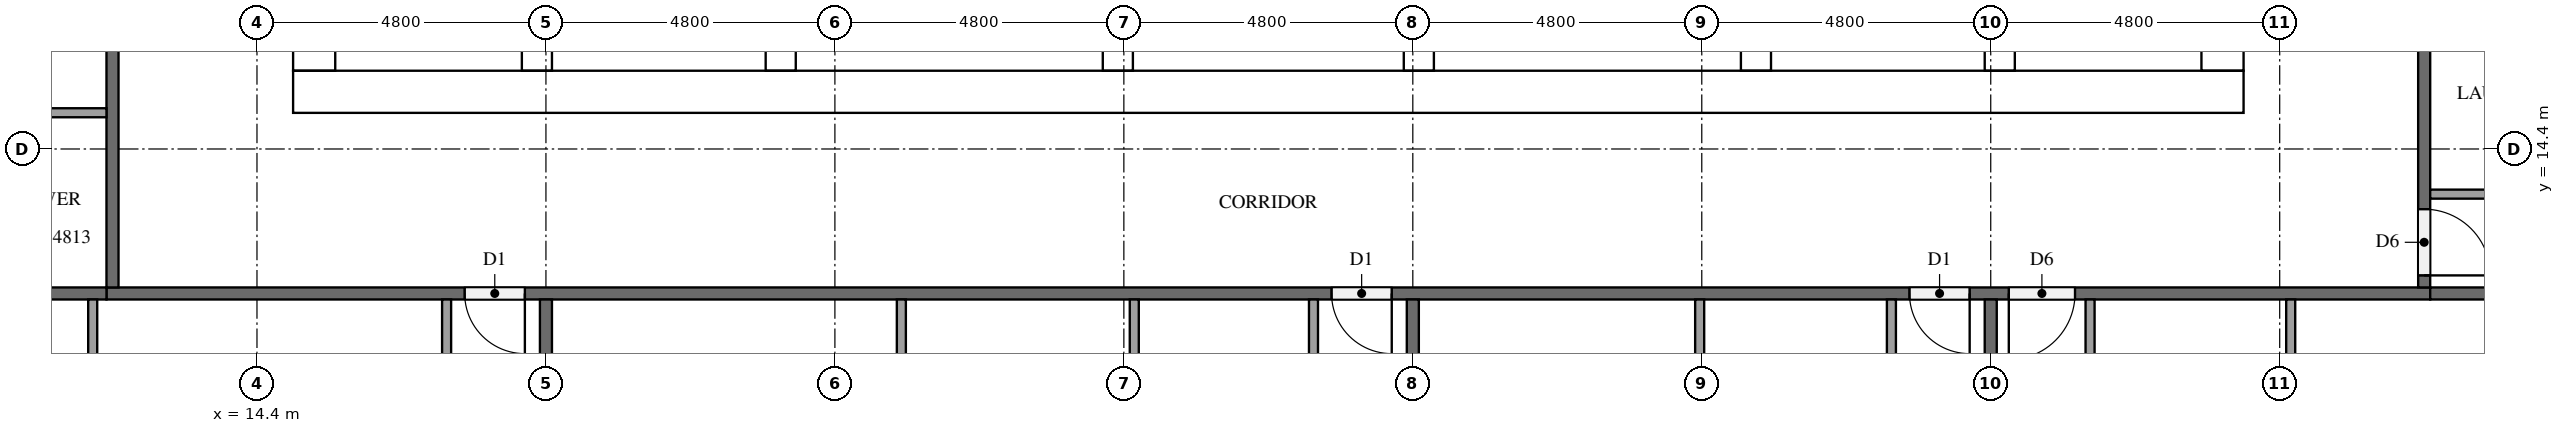
"""IFC4 building model, lengths in metres.
Left out: names, types, materials, properties, quantities, classifications, styles, units other than length and angle.
Written with IfcOpenShell. Run it as: python <this file> out.ifc"""

import sys

from ifc_helpers import new_model, si_unit, direction, frame, frame_2d, origin, place, context, subcontext, project, spatial, rectangle, extrude, element, fill, save


model = new_model("IFC4")
c1 = context("Model", 3, precision=1e-05, world=origin(), true_north=direction((0.0, 1.0)))
c2 = subcontext(c1, "Body", "Model", "MODEL_VIEW")
j1 = project(units=[si_unit("LENGTHUNIT", "METRE"), si_unit("PLANEANGLEUNIT", "RADIAN")], contexts=[c1])
p1 = place(None, origin())
s1 = spatial("IfcSite", under=j1, at=p1, CompositionType="ELEMENT")
p2 = place(p1, origin())
s2 = spatial("IfcBuilding", under=s1, at=p2, CompositionType="ELEMENT")
p3 = place(p2, frame((0.0, 0.0, 185.9)))
s3 = spatial("IfcBuildingStorey", under=s2, at=p3, CompositionType="ELEMENT", Elevation=185.9)
p4 = place(p3, frame((15.0, 15.35, 0.0), z_axis=(0.0, 0.0, 1.0), x_axis=(1.0, 0.0, 0.0)))
e1 = element("IfcWall", 1, at=p4, inside=s3, PredefinedType="SHEAR", context=c2, shape_type="SweptSolid", body=[
    extrude(rectangle(XDim=32.4, YDim=0.7, at=frame_2d((16.2, 0.0))), origin(), (0.0, 0.0, 1.0), 3.2),
])
p5 = place(p4, frame((15.3, 0.0, 0.0)))
e2 = element("IfcOpeningElement", 2, at=p5, cuts=e1, PredefinedType="OPENING", context=c2, shape_type="SweptSolid", body=[
    extrude(rectangle(XDim=1.8, YDim=2.1, at=frame_2d((0.9, 1.05))), frame((0.0, 0.36, 0.0), z_axis=(0.0, -1.0, 0.0), x_axis=(1.0, 0.0, 0.0)), (0.0, 0.0, 1.0), 0.72),
])
p6 = place(p3, frame((15.35, 15.7, 0.0), z_axis=(0.0, 0.0, 1.0), x_axis=(0.0, 1.0, 0.0)))
e3 = element("IfcWall", 3, at=p6, inside=s3, PredefinedType="SHEAR", context=c2, shape_type="SweptSolid", body=[
    extrude(rectangle(XDim=21.4, YDim=0.7, at=frame_2d((10.7, 0.0))), origin(), (0.0, 0.0, 1.0), 3.2),
])
p7 = place(p6, frame((5.06, 0.0, 0.0)))
e4 = element("IfcOpeningElement", 4, at=p7, cuts=e3, PredefinedType="OPENING", context=c2, shape_type="SweptSolid", body=[
    extrude(rectangle(XDim=1.2, YDim=2.1, at=frame_2d((0.6, 1.05))), frame((0.0, 0.36, 0.0), z_axis=(0.0, -1.0, 0.0), x_axis=(1.0, 0.0, 0.0)), (0.0, 0.0, 1.0), 0.72),
])
p8 = place(p3, frame((47.05, 15.7, 0.0), z_axis=(0.0, 0.0, 1.0), x_axis=(0.0, 1.0, 0.0)))
e5 = element("IfcWall", 5, at=p8, inside=s3, PredefinedType="SHEAR", context=c2, shape_type="SweptSolid", body=[
    extrude(rectangle(XDim=21.4, YDim=0.7, at=frame_2d((10.7, 0.0))), origin(), (0.0, 0.0, 1.0), 3.2),
])
p9 = place(p8, frame((10.4, 0.0, 0.0)))
e6 = element("IfcOpeningElement", 6, at=p9, cuts=e5, PredefinedType="OPENING", context=c2, shape_type="SweptSolid", body=[
    extrude(rectangle(XDim=1.2, YDim=2.1, at=frame_2d((0.6, 1.05))), frame((0.0, 0.36, 0.0), z_axis=(0.0, -1.0, 0.0), x_axis=(1.0, 0.0, 0.0)), (0.0, 0.0, 1.0), 0.72),
])
p10 = place(p3, frame((19.05, 15.7, 0.0), z_axis=(0.0, 0.0, 1.0), x_axis=(0.0, 1.0, 0.0)))
e7 = element("IfcWall", 7, at=p10, inside=s3, PredefinedType="SHEAR", context=c2, shape_type="SweptSolid", body=[
    extrude(rectangle(XDim=15.3, YDim=0.5, at=frame_2d((7.65, 0.0))), origin(), (0.0, 0.0, 1.0), 3.2),
])
p11 = place(p10, frame((9.75, 0.0, 0.0)))
e8 = element("IfcOpeningElement", 8, at=p11, cuts=e7, PredefinedType="OPENING", context=c2, shape_type="SweptSolid", body=[
    extrude(rectangle(XDim=1.1, YDim=2.1, at=frame_2d((0.55, 1.05))), frame((0.0, 0.26, 0.0), z_axis=(0.0, -1.0, 0.0), x_axis=(1.0, 0.0, 0.0)), (0.0, 0.0, 1.0), 0.52),
])
p12 = place(p10, frame((13.25, 0.0, 0.0)))
e9 = element("IfcOpeningElement", 9, at=p12, cuts=e7, PredefinedType="OPENING", context=c2, shape_type="SweptSolid", body=[
    extrude(rectangle(XDim=1.1, YDim=2.1, at=frame_2d((0.55, 1.05))), frame((0.0, 0.26, 0.0), z_axis=(0.0, -1.0, 0.0), x_axis=(1.0, 0.0, 0.0)), (0.0, 0.0, 1.0), 0.52),
])
p13 = place(p10, frame((0.5, 0.0, 0.0)))
e10 = element("IfcOpeningElement", 10, at=p13, cuts=e7, PredefinedType="OPENING", context=c2, shape_type="SweptSolid", body=[
    extrude(rectangle(XDim=1.2, YDim=2.1, at=frame_2d((0.6, 1.05))), frame((0.0, 0.26, 0.0), z_axis=(0.0, -1.0, 0.0), x_axis=(1.0, 0.0, 0.0)), (0.0, 0.0, 1.0), 0.52),
])
p14 = place(p3, frame((23.1, 15.7, 0.0), z_axis=(0.0, 0.0, 1.0), x_axis=(0.0, 1.0, 0.0)))
e11 = element("IfcWall", 11, at=p14, inside=s3, PredefinedType="SHEAR", context=c2, shape_type="SweptSolid", body=[
    extrude(rectangle(XDim=21.4, YDim=0.5, at=frame_2d((10.7, 0.0))), origin(), (0.0, 0.0, 1.0), 3.2),
])
p15 = place(p3, frame((39.3, 15.7, 0.0), z_axis=(0.0, 0.0, 1.0), x_axis=(0.0, 1.0, 0.0)))
e12 = element("IfcWall", 12, at=p15, inside=s3, PredefinedType="SHEAR", context=c2, shape_type="SweptSolid", body=[
    extrude(rectangle(XDim=8.55, YDim=0.5, at=frame_2d((4.275, 0.0))), origin(), (0.0, 0.0, 1.0), 3.2),
])
p16 = place(p3, frame((43.35, 15.7, 0.0), z_axis=(0.0, 0.0, 1.0), x_axis=(0.0, 1.0, 0.0)))
e13 = element("IfcWall", 13, at=p16, inside=s3, PredefinedType="SHEAR", context=c2, shape_type="SweptSolid", body=[
    extrude(rectangle(XDim=8.55, YDim=0.5, at=frame_2d((4.275, 0.0))), origin(), (0.0, 0.0, 1.0), 3.2),
])
p17 = place(p16, frame((0.5, 0.0, 0.0)))
e14 = element("IfcOpeningElement", 14, at=p17, cuts=e13, PredefinedType="OPENING", context=c2, shape_type="SweptSolid", body=[
    extrude(rectangle(XDim=1.2, YDim=2.1, at=frame_2d((0.6, 1.05))), frame((0.0, 0.26, 0.0), z_axis=(0.0, -1.0, 0.0), x_axis=(1.0, 0.0, 0.0)), (0.0, 0.0, 1.0), 0.52),
])
for number, where, z_axis, x_axis in (
    (15, (28.7, 15.7, 0.0), (0.0, 0.0, 1.0), (0.0, 1.0, 0.0)),
    (16, (33.7, 15.7, 0.0), (0.0, 0.0, 1.0), (0.0, 1.0, 0.0)),
):
    element("IfcWall", number, at=place(p3, frame(where, z_axis=z_axis, x_axis=x_axis)), inside=s3, PredefinedType="SHEAR", context=c2, shape_type="SweptSolid", body=[
        extrude(rectangle(XDim=2.8, YDim=0.5, at=frame_2d((1.4, 0.0))), origin(), (0.0, 0.0, 1.0), 3.2),
    ])
p18 = place(p3, frame((50.5, 12.0, 0.0), z_axis=(0.0, 0.0, 1.0), x_axis=(-1.0, 0.0, 0.0)))
e17 = element("IfcWall", 17, at=p18, inside=s3, PredefinedType="PARTITIONING", context=c2, shape_type="SweptSolid", body=[
    extrude(rectangle(XDim=38.6, YDim=0.2, at=frame_2d((19.3, 0.0))), origin(), (0.0, 0.0, 1.0), 3.2),
])
p19 = place(p18, frame((31.65, 0.0, 0.0)))
e18 = element("IfcOpeningElement", 18, at=p19, cuts=e17, PredefinedType="OPENING", context=c2, shape_type="SweptSolid", body=[
    extrude(rectangle(XDim=1.0, YDim=2.1, at=frame_2d((0.5, 1.05))), frame((0.0, 0.11, 0.0), z_axis=(0.0, -1.0, 0.0), x_axis=(1.0, 0.0, 0.0)), (0.0, 0.0, 1.0), 0.22),
])
p20 = place(p18, frame((17.25, 0.0, 0.0)))
e19 = element("IfcOpeningElement", 19, at=p20, cuts=e17, PredefinedType="OPENING", context=c2, shape_type="SweptSolid", body=[
    extrude(rectangle(XDim=1.0, YDim=2.1, at=frame_2d((0.5, 1.05))), frame((0.0, 0.11, 0.0), z_axis=(0.0, -1.0, 0.0), x_axis=(1.0, 0.0, 0.0)), (0.0, 0.0, 1.0), 0.22),
])
p21 = place(p18, frame((7.65, 0.0, 0.0)))
e20 = element("IfcOpeningElement", 20, at=p21, cuts=e17, PredefinedType="OPENING", context=c2, shape_type="SweptSolid", body=[
    extrude(rectangle(XDim=1.0, YDim=2.1, at=frame_2d((0.5, 1.05))), frame((0.0, 0.11, 0.0), z_axis=(0.0, -1.0, 0.0), x_axis=(1.0, 0.0, 0.0)), (0.0, 0.0, 1.0), 0.22),
])
p22 = place(p18, frame((5.9, 0.0, 0.0)))
e21 = element("IfcOpeningElement", 21, at=p22, cuts=e17, PredefinedType="OPENING", context=c2, shape_type="SweptSolid", body=[
    extrude(rectangle(XDim=1.1, YDim=2.1, at=frame_2d((0.55, 1.05))), frame((0.0, 0.11, 0.0), z_axis=(0.0, -1.0, 0.0), x_axis=(1.0, 0.0, 0.0)), (0.0, 0.0, 1.0), 0.22),
])
p23 = place(p3, frame((50.4, 40.7, 0.0), z_axis=(0.0, 0.0, 1.0), x_axis=(0.0, -1.0, 0.0)))
e22 = element("IfcWall", 22, at=p23, inside=s3, PredefinedType="PARTITIONING", context=c2, shape_type="SweptSolid", body=[
    extrude(rectangle(XDim=28.6, YDim=0.2, at=frame_2d((14.3, 0.0))), origin(), (0.0, 0.0, 1.0), 3.2),
])
p24 = place(p23, frame((27.3, 0.0, 0.0)))
e23 = element("IfcOpeningElement", 23, at=p24, cuts=e22, PredefinedType="OPENING", context=c2, shape_type="SweptSolid", body=[
    extrude(rectangle(XDim=1.1, YDim=2.1, at=frame_2d((0.55, 1.05))), frame((0.0, 0.11, 0.0), z_axis=(0.0, -1.0, 0.0), x_axis=(1.0, 0.0, 0.0)), (0.0, 0.0, 1.0), 0.22),
])
p25 = place(p23, frame((8.15, 0.0, 0.0)))
e24 = element("IfcOpeningElement", 24, at=p25, cuts=e22, PredefinedType="OPENING", context=c2, shape_type="SweptSolid", body=[
    extrude(rectangle(XDim=1.0, YDim=2.1, at=frame_2d((0.5, 1.05))), frame((0.0, 0.11, 0.0), z_axis=(0.0, -1.0, 0.0), x_axis=(1.0, 0.0, 0.0)), (0.0, 0.0, 1.0), 0.22),
])
p26 = place(p23, frame((0.95, 0.0, 0.0)))
e25 = element("IfcOpeningElement", 25, at=p26, cuts=e22, PredefinedType="OPENING", context=c2, shape_type="SweptSolid", body=[
    extrude(rectangle(XDim=1.0, YDim=2.1, at=frame_2d((0.5, 1.05))), frame((0.0, 0.11, 0.0), z_axis=(0.0, -1.0, 0.0), x_axis=(1.0, 0.0, 0.0)), (0.0, 0.0, 1.0), 0.22),
])
p27 = place(p3, frame((12.0, 12.1, 0.0), z_axis=(0.0, 0.0, 1.0), x_axis=(0.0, 1.0, 0.0)))
e26 = element("IfcWall", 26, at=p27, inside=s3, PredefinedType="PARTITIONING", context=c2, shape_type="SweptSolid", body=[
    extrude(rectangle(XDim=28.6, YDim=0.2, at=frame_2d((14.3, 0.0))), origin(), (0.0, 0.0, 1.0), 3.2),
])
p28 = place(p27, frame((26.65, 0.0, 0.0)))
e27 = element("IfcOpeningElement", 27, at=p28, cuts=e26, PredefinedType="OPENING", context=c2, shape_type="SweptSolid", body=[
    extrude(rectangle(XDim=1.0, YDim=2.1, at=frame_2d((0.5, 1.05))), frame((0.0, 0.11, 0.0), z_axis=(0.0, -1.0, 0.0), x_axis=(1.0, 0.0, 0.0)), (0.0, 0.0, 1.0), 0.22),
])
p29 = place(p27, frame((24.95, 0.0, 0.0)))
e28 = element("IfcOpeningElement", 28, at=p29, cuts=e26, PredefinedType="OPENING", context=c2, shape_type="SweptSolid", body=[
    extrude(rectangle(XDim=1.0, YDim=2.1, at=frame_2d((0.5, 1.05))), frame((0.0, 0.11, 0.0), z_axis=(0.0, -1.0, 0.0), x_axis=(1.0, 0.0, 0.0)), (0.0, 0.0, 1.0), 0.22),
])
p30 = place(p27, frame((12.95, 0.0, 0.0)))
e29 = element("IfcOpeningElement", 29, at=p30, cuts=e26, PredefinedType="OPENING", context=c2, shape_type="SweptSolid", body=[
    extrude(rectangle(XDim=1.0, YDim=2.1, at=frame_2d((0.5, 1.05))), frame((0.0, 0.11, 0.0), z_axis=(0.0, -1.0, 0.0), x_axis=(1.0, 0.0, 0.0)), (0.0, 0.0, 1.0), 0.22),
])
p31 = place(p3, frame((19.2, 11.9, 0.0), z_axis=(0.0, 0.0, 1.0), x_axis=(0.0, -1.0, 0.0)))
e30 = element("IfcWall", 30, at=p31, inside=s3, PredefinedType="PARTITIONING", context=c2, shape_type="SweptSolid", body=[
    extrude(rectangle(XDim=11.575, YDim=0.2, at=frame_2d((5.788, 0.0))), origin(), (0.0, 0.0, 1.0), 3.2),
])
p32 = place(p3, frame((4.9, 12.0, 0.0), z_axis=(0.0, 0.0, 1.0), x_axis=(1.0, 0.0, 0.0)))
e31 = element("IfcWall", 31, at=p32, inside=s3, PredefinedType="PARTITIONING", context=c2, shape_type="SweptSolid", body=[
    extrude(rectangle(XDim=7.0, YDim=0.2, at=frame_2d((3.5, 0.0))), origin(), (0.0, 0.0, 1.0), 3.2),
])
for number, where, z_axis, x_axis in (
    (32, (33.6, 11.9, 0.0), (0.0, 0.0, 1.0), (0.0, -1.0, 0.0)),
    (33, (43.2, 11.9, 0.0), (0.0, 0.0, 1.0), (0.0, -1.0, 0.0)),
):
    element("IfcWall", number, at=place(p3, frame(where, z_axis=z_axis, x_axis=x_axis)), inside=s3, PredefinedType="PARTITIONING", context=c2, shape_type="SweptSolid", body=[
        extrude(rectangle(XDim=11.8, YDim=0.2, at=frame_2d((5.9, 0.0))), origin(), (0.0, 0.0, 1.0), 3.2),
    ])
p33 = place(p3, frame((50.5, 12.0, 0.0), z_axis=(0.0, 0.0, 1.0), x_axis=(1.0, 0.0, 0.0)))
e34 = element("IfcWall", 34, at=p33, inside=s3, PredefinedType="PARTITIONING", context=c2, shape_type="SweptSolid", body=[
    extrude(rectangle(XDim=11.8, YDim=0.2, at=frame_2d((5.9, 0.0))), origin(), (0.0, 0.0, 1.0), 3.2),
])
p34 = place(p3, frame((11.671, 11.9, 0.0), z_axis=(0.0, 0.0, 1.0), x_axis=(0.0, -1.0, 0.0)))
e35 = element("IfcWall", 35, at=p34, inside=s3, PredefinedType="PARTITIONING", context=c2, shape_type="SweptSolid", body=[
    extrude(rectangle(XDim=4.325, YDim=0.15, at=frame_2d((2.163, 0.0))), origin(), (0.0, 0.0, 1.0), 3.2),
])
p35 = place(p3, frame((17.55, 11.9, 0.0), z_axis=(0.0, 0.0, 1.0), x_axis=(0.0, -1.0, 0.0)))
e36 = element("IfcWall", 36, at=p35, inside=s3, PredefinedType="PARTITIONING", context=c2, shape_type="SweptSolid", body=[
    extrude(rectangle(XDim=4.475, YDim=0.15, at=frame_2d((2.237, 0.0))), origin(), (0.0, 0.0, 1.0), 3.2),
])
for number, where, z_axis, x_axis in (
    (37, (28.973, 11.9, 0.0), (0.0, 0.0, 1.0), (0.0, -1.0, 0.0)),
    (38, (25.104, 11.9, 0.0), (0.0, 0.0, 1.0), (0.0, -1.0, 0.0)),
):
    element("IfcWall", number, at=place(p3, frame(where, z_axis=z_axis, x_axis=x_axis)), inside=s3, PredefinedType="PARTITIONING", context=c2, shape_type="SweptSolid", body=[
        extrude(rectangle(XDim=3.575, YDim=0.15, at=frame_2d((1.788, 0.0))), origin(), (0.0, 0.0, 1.0), 3.2),
    ])
for number, where, z_axis, x_axis in (
    (39, (31.95, 11.9, 0.0), (0.0, 0.0, 1.0), (0.0, -1.0, 0.0)),
    (40, (38.365, 11.9, 0.0), (0.0, 0.0, 1.0), (0.0, -1.0, 0.0)),
):
    element("IfcWall", number, at=place(p3, frame(where, z_axis=z_axis, x_axis=x_axis)), inside=s3, PredefinedType="PARTITIONING", context=c2, shape_type="SweptSolid", body=[
        extrude(rectangle(XDim=3.725, YDim=0.15, at=frame_2d((1.862, 0.0))), origin(), (0.0, 0.0, 1.0), 3.2),
    ])
p36 = place(p3, frame((41.55, 11.9, 0.0), z_axis=(0.0, 0.0, 1.0), x_axis=(0.0, -1.0, 0.0)))
e41 = element("IfcWall", 41, at=p36, inside=s3, PredefinedType="PARTITIONING", context=c2, shape_type="SweptSolid", body=[
    extrude(rectangle(XDim=3.875, YDim=0.15, at=frame_2d((1.938, 0.0))), origin(), (0.0, 0.0, 1.0), 3.2),
])
p37 = place(p3, frame((48.183, 11.9, 0.0), z_axis=(0.0, 0.0, 1.0), x_axis=(0.0, -1.0, 0.0)))
e42 = element("IfcWall", 42, at=p37, inside=s3, PredefinedType="PARTITIONING", context=c2, shape_type="SweptSolid", body=[
    extrude(rectangle(XDim=4.325, YDim=0.15, at=frame_2d((2.163, 0.0))), origin(), (0.0, 0.0, 1.0), 3.2),
])
p38 = place(p3, frame((44.85, 11.9, 0.0), z_axis=(0.0, 0.0, 1.0), x_axis=(0.0, -1.0, 0.0)))
e43 = element("IfcWall", 43, at=p38, inside=s3, PredefinedType="PARTITIONING", context=c2, shape_type="SweptSolid", body=[
    extrude(rectangle(XDim=4.475, YDim=0.15, at=frame_2d((2.237, 0.0))), origin(), (0.0, 0.0, 1.0), 3.2),
])
p39 = place(p3, frame((50.5, 13.65, 0.0), z_axis=(0.0, 0.0, 1.0), x_axis=(1.0, 0.0, 0.0)))
e44 = element("IfcWall", 44, at=p39, inside=s3, PredefinedType="PARTITIONING", context=c2, shape_type="SweptSolid", body=[
    extrude(rectangle(XDim=3.275, YDim=0.15, at=frame_2d((1.637, 0.0))), origin(), (0.0, 0.0, 1.0), 3.2),
])
p40 = place(p3, frame((11.9, 15.002, 0.0), z_axis=(0.0, 0.0, 1.0), x_axis=(-1.0, 0.0, 0.0)))
e45 = element("IfcWall", 45, at=p40, inside=s3, PredefinedType="PARTITIONING", context=c2, shape_type="SweptSolid", body=[
    extrude(rectangle(XDim=2.225, YDim=0.15, at=frame_2d((1.112, 0.0))), origin(), (0.0, 0.0, 1.0), 3.2),
])
p41 = place(p5, frame((1.8, 0.0, 0.0), z_axis=(0.0, 0.0, 1.0), x_axis=(-1.0, 0.0, 0.0)))
e46 = element("IfcDoor", 46, at=p41, inside=s3, OperationType="DOUBLE_DOOR_SINGLE_SWING", PredefinedType="DOOR", context=c2, shape_type="SweptSolid", body=[
    extrude(rectangle(XDim=1.8, YDim=2.1, at=frame_2d((0.9, 1.05))), frame((0.0, 0.025, 0.0), z_axis=(0.0, -1.0, 0.0), x_axis=(1.0, 0.0, 0.0)), (0.0, 0.0, 1.0), 0.05),
])
fill(e2, e46)
p42 = place(p19, origin())
e47 = element("IfcDoor", 47, at=p42, inside=s3, OperationType="SINGLE_SWING_LEFT", PredefinedType="DOOR", context=c2, shape_type="SweptSolid", body=[
    extrude(rectangle(XDim=1.0, YDim=2.1, at=frame_2d((0.5, 1.05))), frame((0.0, 0.025, 0.0), z_axis=(0.0, -1.0, 0.0), x_axis=(1.0, 0.0, 0.0)), (0.0, 0.0, 1.0), 0.05),
])
fill(e18, e47)
p43 = place(p20, origin())
e48 = element("IfcDoor", 48, at=p43, inside=s3, OperationType="SINGLE_SWING_LEFT", PredefinedType="DOOR", context=c2, shape_type="SweptSolid", body=[
    extrude(rectangle(XDim=1.0, YDim=2.1, at=frame_2d((0.5, 1.05))), frame((0.0, 0.025, 0.0), z_axis=(0.0, -1.0, 0.0), x_axis=(1.0, 0.0, 0.0)), (0.0, 0.0, 1.0), 0.05),
])
fill(e19, e48)
p44 = place(p21, origin())
e49 = element("IfcDoor", 49, at=p44, inside=s3, OperationType="SINGLE_SWING_LEFT", PredefinedType="DOOR", context=c2, shape_type="SweptSolid", body=[
    extrude(rectangle(XDim=1.0, YDim=2.1, at=frame_2d((0.5, 1.05))), frame((0.0, 0.025, 0.0), z_axis=(0.0, -1.0, 0.0), x_axis=(1.0, 0.0, 0.0)), (0.0, 0.0, 1.0), 0.05),
])
fill(e20, e49)
p45 = place(p22, origin())
e50 = element("IfcDoor", 50, at=p45, inside=s3, OperationType="SINGLE_SWING_RIGHT", PredefinedType="DOOR", context=c2, shape_type="SweptSolid", body=[
    extrude(rectangle(XDim=1.1, YDim=2.1, at=frame_2d((0.55, 1.05))), frame((0.0, 0.025, 0.0), z_axis=(0.0, -1.0, 0.0), x_axis=(1.0, 0.0, 0.0)), (0.0, 0.0, 1.0), 0.05),
])
fill(e21, e50)
p46 = place(p24, origin())
e51 = element("IfcDoor", 51, at=p46, inside=s3, OperationType="SINGLE_SWING_RIGHT", PredefinedType="DOOR", context=c2, shape_type="SweptSolid", body=[
    extrude(rectangle(XDim=1.1, YDim=2.1, at=frame_2d((0.55, 1.05))), frame((0.0, 0.025, 0.0), z_axis=(0.0, -1.0, 0.0), x_axis=(1.0, 0.0, 0.0)), (0.0, 0.0, 1.0), 0.05),
])
fill(e23, e51)
save(model, sys.argv[1])
